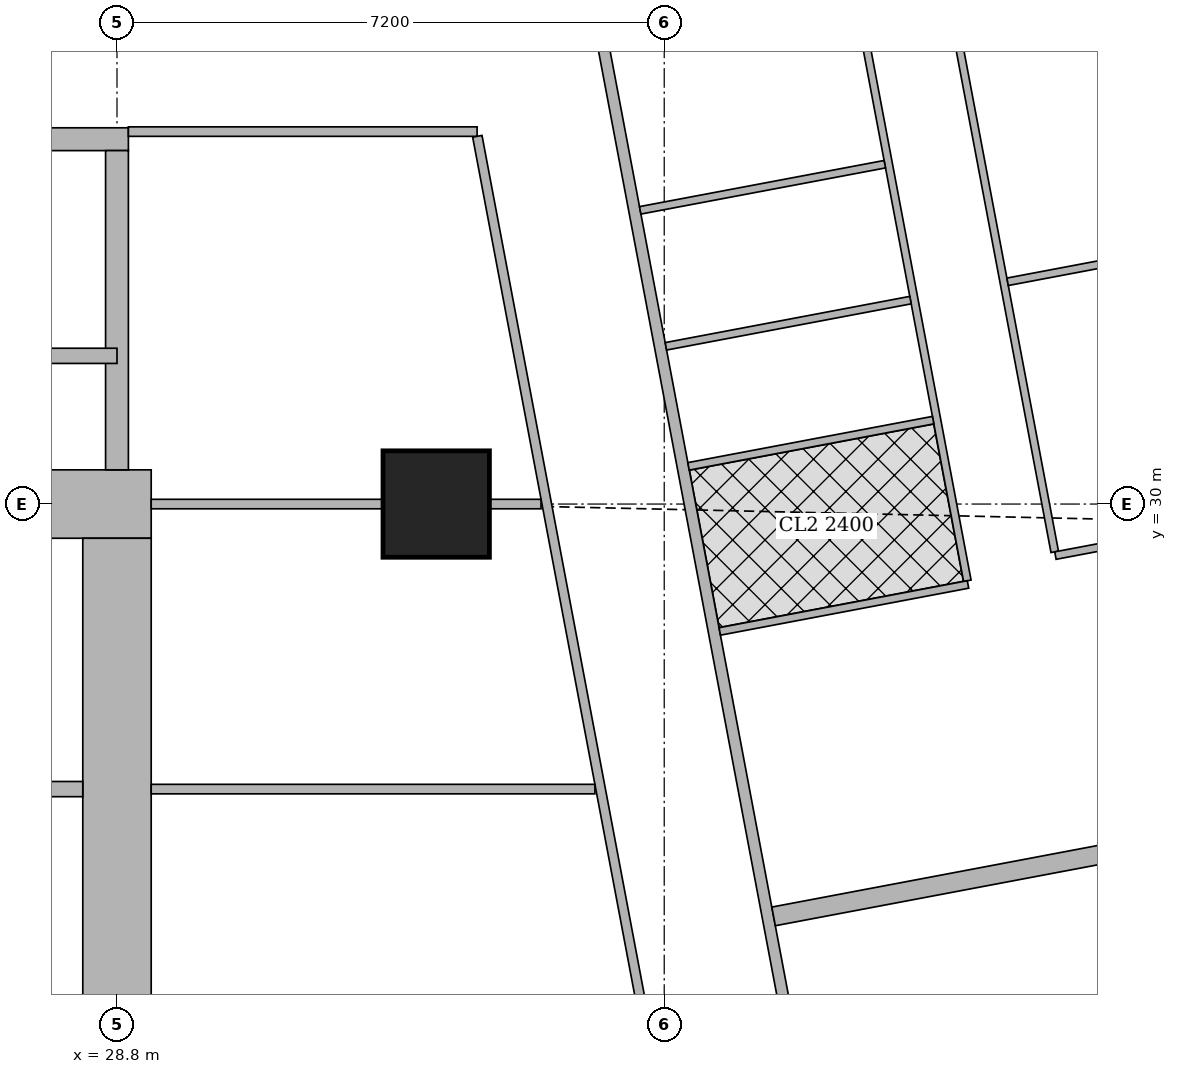
"""IFC4 building model, lengths in metres.
Left out: names, types, materials, properties, quantities, classifications, styles, units other than length and angle.
Written with IfcOpenShell. Run it as: python <this file> out.ifc"""

import sys

from ifc_helpers import new_model, si_unit, direction, frame, frame_2d, origin, origin_2d, place, context, subcontext, project, spatial, rectangle, extrude, element, fill, save


model = new_model("IFC4")
c1 = context("Model", 3, precision=1e-05, world=origin(), true_north=direction((0.0, 1.0)))
c2 = subcontext(c1, "Body", "Model", "MODEL_VIEW")
j1 = project(units=[si_unit("LENGTHUNIT", "METRE"), si_unit("PLANEANGLEUNIT", "RADIAN")], contexts=[c1])
p1 = place(None, origin())
s1 = spatial("IfcSite", under=j1, at=p1, CompositionType="ELEMENT")
p2 = place(p1, origin())
s2 = spatial("IfcBuilding", under=s1, at=p2, CompositionType="ELEMENT")
p3 = place(p2, frame((0.0, 0.0, 262.85)))
s3 = spatial("IfcBuildingStorey", under=s2, at=p3, CompositionType="ELEMENT", Elevation=262.85)
p4 = place(p3, frame((33.0, 30.0, 0.0), z_axis=(0.0, 0.0, 1.0), x_axis=(1.0, 0.0, 0.0)))
e1 = element("IfcColumn", 1, at=p4, inside=s3, PredefinedType="COLUMN", context=c2, shape_type="SweptSolid", body=[
    extrude(rectangle(XDim=1.4, YDim=1.4, at=origin_2d()), origin(), (0.0, 0.0, 1.0), 3.75),
])
p5 = place(p3, frame((13.95, 30.0, 0.0), z_axis=(0.0, 0.0, 1.0), x_axis=(1.0, 0.0, 0.0)))
e2 = element("IfcWall", 2, at=p5, inside=s3, PredefinedType="SHEAR", context=c2, shape_type="SweptSolid", body=[
    extrude(rectangle(XDim=15.3, YDim=0.9, at=frame_2d((7.65, 0.0))), origin(), (0.0, 0.0, 1.0), 3.75),
])
p6 = place(p5, frame((4.45, 0.0, 0.0)))
e3 = element("IfcOpeningElement", 3, at=p6, cuts=e2, PredefinedType="OPENING", context=c2, shape_type="SweptSolid", body=[
    extrude(rectangle(XDim=1.8, YDim=2.1, at=frame_2d((0.9, 1.05))), frame((0.0, 0.46, 0.0), z_axis=(0.0, -1.0, 0.0), x_axis=(1.0, 0.0, 0.0)), (0.0, 0.0, 1.0), 0.92),
])
p7 = place(p5, frame((10.7, 0.0, 0.0)))
e4 = element("IfcOpeningElement", 4, at=p7, cuts=e2, PredefinedType="OPENING", context=c2, shape_type="SweptSolid", body=[
    extrude(rectangle(XDim=1.1, YDim=2.1, at=frame_2d((0.55, 1.05))), frame((0.0, 0.46, 0.0), z_axis=(0.0, -1.0, 0.0), x_axis=(1.0, 0.0, 0.0)), (0.0, 0.0, 1.0), 0.92),
])
p8 = place(p3, frame((28.8, 15.45, 0.0), z_axis=(0.0, 0.0, 1.0), x_axis=(0.0, 1.0, 0.0)))
e5 = element("IfcWall", 5, at=p8, inside=s3, PredefinedType="SHEAR", context=c2, shape_type="SweptSolid", body=[
    extrude(rectangle(XDim=14.1, YDim=0.9, at=frame_2d((7.05, 0.0))), origin(), (0.0, 0.0, 1.0), 3.75),
])
p9 = place(p3, frame((21.45, 34.8, 0.0), z_axis=(0.0, 0.0, 1.0), x_axis=(1.0, 0.0, 0.0)))
e6 = element("IfcWall", 6, at=p9, inside=s3, PredefinedType="SHEAR", context=c2, shape_type="SweptSolid", body=[
    extrude(rectangle(XDim=7.5, YDim=0.3, at=frame_2d((3.75, 0.0))), origin(), (0.0, 0.0, 1.0), 3.75),
])
p10 = place(p9, frame((0.5, 0.0, 0.0)))
e7 = element("IfcOpeningElement", 7, at=p10, cuts=e6, PredefinedType="OPENING", context=c2, shape_type="SweptSolid", body=[
    extrude(rectangle(XDim=1.1, YDim=2.1, at=frame_2d((0.55, 1.05))), frame((0.0, 0.16, 0.0), z_axis=(0.0, -1.0, 0.0), x_axis=(1.0, 0.0, 0.0)), (0.0, 0.0, 1.0), 0.32),
])
p11 = place(p3, frame((28.8, 30.45, 0.0), z_axis=(0.0, 0.0, 1.0), x_axis=(0.0, 1.0, 0.0)))
e8 = element("IfcWall", 8, at=p11, inside=s3, PredefinedType="SHEAR", context=c2, shape_type="SweptSolid", body=[
    extrude(rectangle(XDim=4.2, YDim=0.3, at=frame_2d((2.1, 0.0))), origin(), (0.0, 0.0, 1.0), 3.75),
])
p12 = place(p3, frame((34.036, 42.186, 0.0), z_axis=(0.0, 0.0, 1.0), x_axis=(0.185593518645, -0.9826266055, 0.0)))
e9 = element("IfcWall", 9, at=p12, inside=s3, PredefinedType="SOLIDWALL", context=c2, shape_type="SweptSolid", body=[
    extrude(rectangle(XDim=35.961, YDim=0.15, at=frame_2d((17.98, 0.0))), origin(), (0.0, 0.0, 1.0), 2.5),
])
p13 = place(p12, frame((15.529, 0.0, 0.0)))
e10 = element("IfcOpeningElement", 10, at=p13, cuts=e9, PredefinedType="OPENING", context=c2, shape_type="SweptSolid", body=[
    extrude(rectangle(XDim=1.0, YDim=2.1, at=frame_2d((0.5, 1.05))), frame((0.0, 0.085, 0.0), z_axis=(0.0, -1.0, 0.0), x_axis=(1.0, 0.0, 0.0)), (0.0, 0.0, 1.0), 0.17),
])
p14 = place(p12, frame((19.345, 0.0, 0.0)))
e11 = element("IfcOpeningElement", 11, at=p14, cuts=e9, PredefinedType="OPENING", context=c2, shape_type="SweptSolid", body=[
    extrude(rectangle(XDim=1.0, YDim=2.1, at=frame_2d((0.5, 1.05))), frame((0.0, 0.085, 0.0), z_axis=(0.0, -1.0, 0.0), x_axis=(1.0, 0.0, 0.0)), (0.0, 0.0, 1.0), 0.17),
])
p15 = place(p12, frame((30.594, 0.0, 0.0)))
e12 = element("IfcOpeningElement", 12, at=p15, cuts=e9, PredefinedType="OPENING", context=c2, shape_type="SweptSolid", body=[
    extrude(rectangle(XDim=1.0, YDim=2.1, at=frame_2d((0.5, 1.05))), frame((0.0, 0.085, 0.0), z_axis=(0.0, -1.0, 0.0), x_axis=(1.0, 0.0, 0.0)), (0.0, 0.0, 1.0), 0.17),
])
p16 = place(p3, frame((38.744, 42.045, 0.0), z_axis=(0.0, 0.0, 1.0), x_axis=(0.185614085367, -0.982622720739, 0.0)))
e13 = element("IfcWall", 13, at=p16, inside=s3, PredefinedType="PARTITIONING", context=c2, shape_type="SweptSolid", body=[
    extrude(rectangle(XDim=12.898, YDim=0.1, at=frame_2d((6.449, 0.0))), origin(), (0.0, 0.0, 1.0), 2.5),
])
p17 = place(p16, frame((11.848, 0.0, 0.0)))
e14 = element("IfcOpeningElement", 14, at=p17, cuts=e13, PredefinedType="OPENING", context=c2, shape_type="SweptSolid", body=[
    extrude(rectangle(XDim=0.9, YDim=2.1, at=frame_2d((0.45, 1.05))), frame((0.0, 0.06, 0.0), z_axis=(0.0, -1.0, 0.0), x_axis=(1.0, 0.0, 0.0)), (0.0, 0.0, 1.0), 0.12),
])
p18 = place(p16, frame((8.191, 0.0, 0.0)))
e15 = element("IfcOpeningElement", 15, at=p18, cuts=e13, PredefinedType="OPENING", context=c2, shape_type="SweptSolid", body=[
    extrude(rectangle(XDim=0.9, YDim=2.1, at=frame_2d((0.45, 1.05))), frame((0.0, 0.06, 0.0), z_axis=(0.0, -1.0, 0.0), x_axis=(1.0, 0.0, 0.0)), (0.0, 0.0, 1.0), 0.12),
])
p19 = place(p16, frame((4.215, 0.0, 0.0)))
e16 = element("IfcOpeningElement", 16, at=p19, cuts=e13, PredefinedType="OPENING", context=c2, shape_type="SweptSolid", body=[
    extrude(rectangle(XDim=0.9, YDim=2.1, at=frame_2d((0.45, 1.05))), frame((0.0, 0.06, 0.0), z_axis=(0.0, -1.0, 0.0), x_axis=(1.0, 0.0, 0.0)), (0.0, 0.0, 1.0), 0.12),
])
p20 = place(p3, frame((37.511, 42.109, 0.0), z_axis=(0.0, 0.0, 1.0), x_axis=(0.185550464988, -0.982634736279, 0.0)))
e17 = element("IfcWall", 17, at=p20, inside=s3, PredefinedType="PARTITIONING", context=c2, shape_type="SweptSolid", body=[
    extrude(rectangle(XDim=13.35, YDim=0.1, at=frame_2d((6.675, 0.0))), origin(), (0.0, 0.0, 1.0), 2.5),
])
p21 = place(p20, frame((11.845, 0.0, 0.0)))
e18 = element("IfcOpeningElement", 18, at=p21, cuts=e17, PredefinedType="OPENING", context=c2, shape_type="SweptSolid", body=[
    extrude(rectangle(XDim=0.9, YDim=2.1, at=frame_2d((0.45, 1.05))), frame((0.0, 0.06, 0.0), z_axis=(0.0, -1.0, 0.0), x_axis=(1.0, 0.0, 0.0)), (0.0, 0.0, 1.0), 0.12),
])
p22 = place(p20, frame((8.224, 0.0, 0.0)))
e19 = element("IfcOpeningElement", 19, at=p22, cuts=e17, PredefinedType="OPENING", context=c2, shape_type="SweptSolid", body=[
    extrude(rectangle(XDim=0.9, YDim=2.1, at=frame_2d((0.45, 1.05))), frame((0.0, 0.06, 0.0), z_axis=(0.0, -1.0, 0.0), x_axis=(1.0, 0.0, 0.0)), (0.0, 0.0, 1.0), 0.12),
])
p23 = place(p20, frame((2.65, 0.0, 0.0)))
e20 = element("IfcOpeningElement", 20, at=p23, cuts=e17, PredefinedType="OPENING", context=c2, shape_type="SweptSolid", body=[
    extrude(rectangle(XDim=0.9, YDim=2.1, at=frame_2d((0.45, 1.05))), frame((0.0, 0.06, 0.0), z_axis=(0.0, -1.0, 0.0), x_axis=(1.0, 0.0, 0.0)), (0.0, 0.0, 1.0), 0.12),
])
p24 = place(p20, frame((9.936, 0.0, 0.0)))
e21 = element("IfcOpeningElement", 21, at=p24, cuts=e17, PredefinedType="OPENING", context=c2, shape_type="SweptSolid", body=[
    extrude(rectangle(XDim=0.9, YDim=2.1, at=frame_2d((0.45, 1.05))), frame((0.0, 0.06, 0.0), z_axis=(0.0, -1.0, 0.0), x_axis=(1.0, 0.0, 0.0)), (0.0, 0.0, 1.0), 0.12),
])
p25 = place(p20, frame((5.555, 0.0, 0.0)))
e22 = element("IfcOpeningElement", 22, at=p25, cuts=e17, PredefinedType="OPENING", context=c2, shape_type="SweptSolid", body=[
    extrude(rectangle(XDim=0.9, YDim=2.1, at=frame_2d((0.45, 1.05))), frame((0.0, 0.06, 0.0), z_axis=(0.0, -1.0, 0.0), x_axis=(1.0, 0.0, 0.0)), (0.0, 0.0, 1.0), 0.12),
])
p26 = place(p3, frame((44.693, 33.713, 0.0), z_axis=(0.0, 0.0, 1.0), x_axis=(-0.982615600536, -0.185651775062, 0.0)))
e23 = element("IfcWall", 23, at=p26, inside=s3, PredefinedType="PARTITIONING", context=c2, shape_type="SweptSolid", body=[
    extrude(rectangle(XDim=4.249, YDim=0.1, at=frame_2d((2.125, 0.0))), origin(), (0.0, 0.0, 1.0), 2.5),
])
p27 = place(p3, frame((42.47, 29.572, 0.0), z_axis=(0.0, 0.0, 1.0), x_axis=(-0.982610503289, -0.185678751683, 0.0)))
e24 = element("IfcWall", 24, at=p27, inside=s3, PredefinedType="PARTITIONING", context=c2, shape_type="SweptSolid", body=[
    extrude(rectangle(XDim=1.346, YDim=0.1, at=frame_2d((0.673, 0.0))), origin(), (0.0, 0.0, 1.0), 2.5),
])
p28 = place(p3, frame((39.24, 32.683, 0.0), z_axis=(0.0, 0.0, 1.0), x_axis=(-0.982607026909, -0.185697147715, 0.0)))
e25 = element("IfcWall", 25, at=p28, inside=s3, PredefinedType="PARTITIONING", context=c2, shape_type="SweptSolid", body=[
    extrude(rectangle(XDim=3.275, YDim=0.1, at=frame_2d((1.637, 0.0))), origin(), (0.0, 0.0, 1.0), 3.5),
])
p29 = place(p3, frame((39.997, 28.942, 0.0), z_axis=(0.0, 0.0, 1.0), x_axis=(-0.982569883123, -0.185893584556, 0.0)))
e26 = element("IfcWall", 26, at=p29, inside=s3, PredefinedType="PARTITIONING", context=c2, shape_type="SweptSolid", body=[
    extrude(rectangle(XDim=3.324, YDim=0.1, at=frame_2d((1.662, 0.0))), origin(), (0.0, 0.0, 1.0), 3.5),
])
p30 = place(p3, frame((39.538, 31.104, 0.0), z_axis=(0.0, 0.0, 1.0), x_axis=(-0.982620626894, -0.185625169636, 0.0)))
e27 = element("IfcWall", 27, at=p30, inside=s3, PredefinedType="PARTITIONING", context=c2, shape_type="SweptSolid", body=[
    extrude(rectangle(XDim=3.275, YDim=0.1, at=frame_2d((1.637, 0.0))), origin(), (0.0, 0.0, 1.0), 2.5),
])
p31 = place(p3, frame((38.902, 34.471, 0.0), z_axis=(0.0, 0.0, 1.0), x_axis=(-0.982674977865, -0.185337227447, 0.0)))
e28 = element("IfcWall", 28, at=p31, inside=s3, PredefinedType="PARTITIONING", context=c2, shape_type="SweptSolid", body=[
    extrude(rectangle(XDim=3.275, YDim=0.1, at=frame_2d((1.637, 0.0))), origin(), (0.0, 0.0, 1.0), 3.5),
])
p32 = place(p3, frame((41.885, 25.415, 0.0), z_axis=(0.0, 0.0, 1.0), x_axis=(-0.982612837616, -0.185666398014, 0.0)))
e29 = element("IfcWall", 29, at=p32, inside=s3, PredefinedType="SOLIDWALL", context=c2, shape_type="SweptSolid", body=[
    extrude(rectangle(XDim=4.525, YDim=0.25, at=frame_2d((2.262, 0.0))), origin(), (0.0, 0.0, 1.0), 3.5),
])
p33 = place(p3, frame((28.95, 34.9, 0.0), z_axis=(0.0, 0.0, 1.0), x_axis=(1.0, 0.0, 0.0)))
e30 = element("IfcWall", 30, at=p33, inside=s3, PredefinedType="PARTITIONING", context=c2, shape_type="SweptSolid", body=[
    extrude(rectangle(XDim=4.588, YDim=0.125, at=frame_2d((2.294, 0.0))), origin(), (0.0, 0.0, 1.0), 3.5),
])
p34 = place(p3, frame((38.202, 10.163, 0.0), z_axis=(0.0, 0.0, 1.0), x_axis=(-0.185610321132, 0.982623431783, 0.0)))
e31 = element("IfcWall", 31, at=p34, inside=s3, PredefinedType="PARTITIONING", context=c2, shape_type="SweptSolid", body=[
    extrude(rectangle(XDim=25.111, YDim=0.125, at=frame_2d((12.556, 0.0))), origin(), (0.0, 0.0, 1.0), 2.5),
])
p35 = place(p34, frame((0.708, 0.0, 0.0)))
e32 = element("IfcOpeningElement", 32, at=p35, cuts=e31, PredefinedType="OPENING", context=c2, shape_type="SweptSolid", body=[
    extrude(rectangle(XDim=1.0, YDim=2.1, at=frame_2d((0.5, 1.05))), frame((0.0, 0.073, 0.0), z_axis=(0.0, -1.0, 0.0), x_axis=(1.0, 0.0, 0.0)), (0.0, 0.0, 1.0), 0.145),
])
p36 = place(p34, frame((5.9, 0.0, 0.0)))
e33 = element("IfcOpeningElement", 33, at=p36, cuts=e31, PredefinedType="OPENING", context=c2, shape_type="SweptSolid", body=[
    extrude(rectangle(XDim=1.0, YDim=2.1, at=frame_2d((0.5, 1.05))), frame((0.0, 0.073, 0.0), z_axis=(0.0, -1.0, 0.0), x_axis=(1.0, 0.0, 0.0)), (0.0, 0.0, 1.0), 0.145),
])
p37 = place(p34, frame((13.378, 0.0, 0.0)))
e34 = element("IfcOpeningElement", 34, at=p37, cuts=e31, PredefinedType="OPENING", context=c2, shape_type="SweptSolid", body=[
    extrude(rectangle(XDim=1.0, YDim=2.1, at=frame_2d((0.5, 1.05))), frame((0.0, 0.073, 0.0), z_axis=(0.0, -1.0, 0.0), x_axis=(1.0, 0.0, 0.0)), (0.0, 0.0, 1.0), 0.145),
])
p38 = place(p34, frame((17.194, 0.0, 0.0)))
e35 = element("IfcOpeningElement", 35, at=p38, cuts=e31, PredefinedType="OPENING", context=c2, shape_type="SweptSolid", body=[
    extrude(rectangle(XDim=1.0, YDim=2.1, at=frame_2d((0.5, 1.05))), frame((0.0, 0.073, 0.0), z_axis=(0.0, -1.0, 0.0), x_axis=(1.0, 0.0, 0.0)), (0.0, 0.0, 1.0), 0.145),
])
p39 = place(p34, frame((21.15, 0.0, 0.0)))
e36 = element("IfcOpeningElement", 36, at=p39, cuts=e31, PredefinedType="OPENING", context=c2, shape_type="SweptSolid", body=[
    extrude(rectangle(XDim=1.0, YDim=2.1, at=frame_2d((0.5, 1.05))), frame((0.0, 0.073, 0.0), z_axis=(0.0, -1.0, 0.0), x_axis=(1.0, 0.0, 0.0)), (0.0, 0.0, 1.0), 0.145),
])
p40 = place(p3, frame((29.25, 26.25, 0.0), z_axis=(0.0, 0.0, 1.0), x_axis=(1.0, 0.0, 0.0)))
e37 = element("IfcWall", 37, at=p40, inside=s3, PredefinedType="PARTITIONING", context=c2, shape_type="SweptSolid", body=[
    extrude(rectangle(XDim=5.838, YDim=0.125, at=frame_2d((2.919, 0.0))), origin(), (0.0, 0.0, 1.0), 3.5),
])
p41 = place(p3, frame((29.25, 30.0, 0.0), z_axis=(0.0, 0.0, 1.0), x_axis=(1.0, 0.0, 0.0)))
e38 = element("IfcWall", 38, at=p41, inside=s3, PredefinedType="PARTITIONING", context=c2, shape_type="SweptSolid", body=[
    extrude(rectangle(XDim=3.049, YDim=0.125, at=frame_2d((1.524, 0.0))), origin(), (0.0, 0.0, 1.0), 3.5),
])
p42 = place(p3, frame((33.701, 30.0, 0.0), z_axis=(0.0, 0.0, 1.0), x_axis=(1.0, 0.0, 0.0)))
e39 = element("IfcWall", 39, at=p42, inside=s3, PredefinedType="PARTITIONING", context=c2, shape_type="SweptSolid", body=[
    extrude(rectangle(XDim=0.678, YDim=0.125, at=frame_2d((0.339, 0.0))), origin(), (0.0, 0.0, 1.0), 2.5),
])
p43 = place(p3, frame((23.0, 31.95, 0.0), z_axis=(0.0, 0.0, 1.0), x_axis=(1.0, 0.0, 0.0)))
e40 = element("IfcWall", 40, at=p43, inside=s3, PredefinedType="SHEAR", context=c2, shape_type="SweptSolid", body=[
    extrude(rectangle(XDim=5.8, YDim=0.2, at=frame_2d((2.9, 0.0))), origin(), (0.0, 0.0, 1.0), 3.75),
])
p44 = place(p3, frame((27.4, 26.25, 0.0), z_axis=(0.0, 0.0, 1.0), x_axis=(1.0, 0.0, 0.0)))
e41 = element("IfcWall", 41, at=p44, inside=s3, PredefinedType="SOLIDWALL", context=c2, shape_type="SweptSolid", body=[
    extrude(rectangle(XDim=0.95, YDim=0.2, at=frame_2d((0.475, 0.0))), origin(), (0.0, 0.0, 1.0), 3.5),
])
p45 = place(p17, origin())
e42 = element("IfcDoor", 42, at=p45, inside=s3, OperationType="SINGLE_SWING_RIGHT", PredefinedType="DOOR", context=c2, shape_type="SweptSolid", body=[
    extrude(rectangle(XDim=0.9, YDim=2.1, at=frame_2d((0.45, 1.05))), frame((0.0, 0.025, 0.0), z_axis=(0.0, -1.0, 0.0), x_axis=(1.0, 0.0, 0.0)), (0.0, 0.0, 1.0), 0.05),
])
fill(e14, e42)
p46 = place(p18, origin())
e43 = element("IfcDoor", 43, at=p46, inside=s3, OperationType="SINGLE_SWING_RIGHT", PredefinedType="DOOR", context=c2, shape_type="SweptSolid", body=[
    extrude(rectangle(XDim=0.9, YDim=2.1, at=frame_2d((0.45, 1.05))), frame((0.0, 0.025, 0.0), z_axis=(0.0, -1.0, 0.0), x_axis=(1.0, 0.0, 0.0)), (0.0, 0.0, 1.0), 0.05),
])
fill(e15, e43)
p47 = place(p21, origin())
e44 = element("IfcDoor", 44, at=p47, inside=s3, OperationType="SINGLE_SWING_LEFT", PredefinedType="DOOR", context=c2, shape_type="SweptSolid", body=[
    extrude(rectangle(XDim=0.9, YDim=2.1, at=frame_2d((0.45, 1.05))), frame((0.0, 0.025, 0.0), z_axis=(0.0, -1.0, 0.0), x_axis=(1.0, 0.0, 0.0)), (0.0, 0.0, 1.0), 0.05),
])
fill(e18, e44)
p48 = place(p22, origin())
e45 = element("IfcDoor", 45, at=p48, inside=s3, OperationType="SINGLE_SWING_RIGHT", PredefinedType="DOOR", context=c2, shape_type="SweptSolid", body=[
    extrude(rectangle(XDim=0.9, YDim=2.1, at=frame_2d((0.45, 1.05))), frame((0.0, 0.025, 0.0), z_axis=(0.0, -1.0, 0.0), x_axis=(1.0, 0.0, 0.0)), (0.0, 0.0, 1.0), 0.05),
])
fill(e19, e45)
p49 = place(p24, origin())
e46 = element("IfcDoor", 46, at=p49, inside=s3, OperationType="SINGLE_SWING_LEFT", PredefinedType="DOOR", context=c2, shape_type="SweptSolid", body=[
    extrude(rectangle(XDim=0.9, YDim=2.1, at=frame_2d((0.45, 1.05))), frame((0.0, 0.025, 0.0), z_axis=(0.0, -1.0, 0.0), x_axis=(1.0, 0.0, 0.0)), (0.0, 0.0, 1.0), 0.05),
])
fill(e21, e46)
p50 = place(p25, origin())
e47 = element("IfcDoor", 47, at=p50, inside=s3, OperationType="SINGLE_SWING_LEFT", PredefinedType="DOOR", context=c2, shape_type="SweptSolid", body=[
    extrude(rectangle(XDim=0.9, YDim=2.1, at=frame_2d((0.45, 1.05))), frame((0.0, 0.025, 0.0), z_axis=(0.0, -1.0, 0.0), x_axis=(1.0, 0.0, 0.0)), (0.0, 0.0, 1.0), 0.05),
])
fill(e22, e47)
p51 = place(p13, origin())
e48 = element("IfcDoor", 48, at=p51, inside=s3, OperationType="SINGLE_SWING_LEFT", PredefinedType="DOOR", context=c2, shape_type="SweptSolid", body=[
    extrude(rectangle(XDim=1.0, YDim=2.1, at=frame_2d((0.5, 1.05))), frame((0.0, 0.025, 0.0), z_axis=(0.0, -1.0, 0.0), x_axis=(1.0, 0.0, 0.0)), (0.0, 0.0, 1.0), 0.05),
])
fill(e10, e48)
p52 = place(p37, origin())
e49 = element("IfcDoor", 49, at=p52, inside=s3, OperationType="SINGLE_SWING_LEFT", PredefinedType="DOOR", context=c2, shape_type="SweptSolid", body=[
    extrude(rectangle(XDim=1.0, YDim=2.1, at=frame_2d((0.5, 1.05))), frame((0.0, 0.025, 0.0), z_axis=(0.0, -1.0, 0.0), x_axis=(1.0, 0.0, 0.0)), (0.0, 0.0, 1.0), 0.05),
])
fill(e34, e49)
p53 = place(p38, origin())
e50 = element("IfcDoor", 50, at=p53, inside=s3, OperationType="SINGLE_SWING_LEFT", PredefinedType="DOOR", context=c2, shape_type="SweptSolid", body=[
    extrude(rectangle(XDim=1.0, YDim=2.1, at=frame_2d((0.5, 1.05))), frame((0.0, 0.025, 0.0), z_axis=(0.0, -1.0, 0.0), x_axis=(1.0, 0.0, 0.0)), (0.0, 0.0, 1.0), 0.05),
])
fill(e35, e50)
p54 = place(p39, origin())
e51 = element("IfcDoor", 51, at=p54, inside=s3, OperationType="SINGLE_SWING_LEFT", PredefinedType="DOOR", context=c2, shape_type="SweptSolid", body=[
    extrude(rectangle(XDim=1.0, YDim=2.1, at=frame_2d((0.5, 1.05))), frame((0.0, 0.025, 0.0), z_axis=(0.0, -1.0, 0.0), x_axis=(1.0, 0.0, 0.0)), (0.0, 0.0, 1.0), 0.05),
])
fill(e36, e51)
save(model, sys.argv[1])
